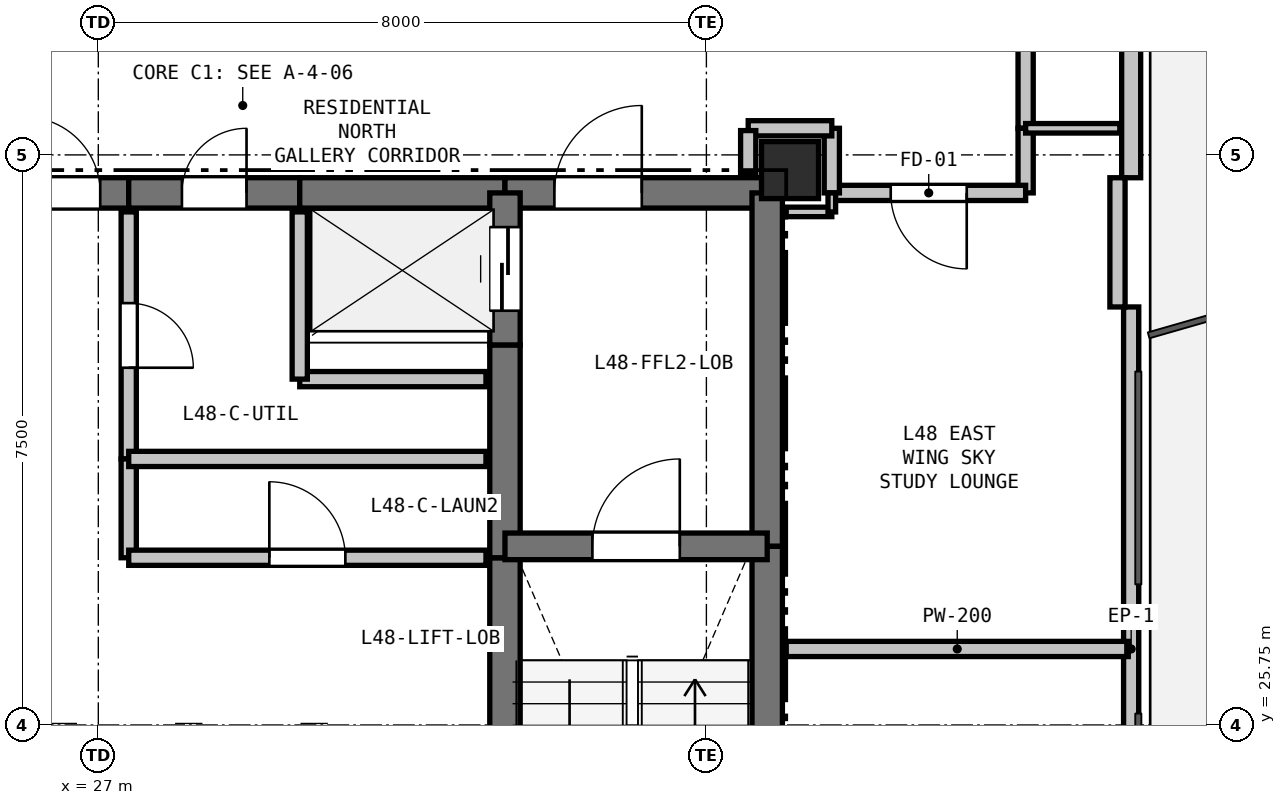
"""IFC4 building model, lengths in metres.
Left out: names, types, materials, properties, quantities, classifications, styles, units other than length and angle.
Written with IfcOpenShell. Run it as: python <this file> out.ifc"""

import sys

from ifc_helpers import new_model, si_unit, direction, frame, frame_2d, origin, origin_2d, place, context, subcontext, project, spatial, rectangle, extrude, element, fill, save


model = new_model("IFC4")
c1 = context("Model", 3, precision=1e-05, world=origin(), true_north=direction((0.0, 1.0)))
c2 = subcontext(c1, "Body", "Model", "MODEL_VIEW")
j1 = project(units=[si_unit("LENGTHUNIT", "METRE"), si_unit("PLANEANGLEUNIT", "RADIAN")], contexts=[c1])
p1 = place(None, origin())
s1 = spatial("IfcSite", under=j1, at=p1, CompositionType="ELEMENT")
p2 = place(p1, origin())
s2 = spatial("IfcBuilding", under=s1, at=p2, CompositionType="ELEMENT")
p3 = place(p2, frame((0.0, 0.0, 175.5)))
s3 = spatial("IfcBuildingStorey", under=s2, at=p3, CompositionType="ELEMENT", Elevation=175.5)
p4 = place(p3, frame((36.1, 33.05, 0.0), z_axis=(0.0, 0.0, 1.0), x_axis=(1.0, 0.0, 0.0)))
e1 = element("IfcColumn", 1, at=p4, inside=s3, PredefinedType="COLUMN", context=c2, shape_type="SweptSolid", body=[
    extrude(rectangle(XDim=0.75, YDim=0.75, at=origin_2d()), origin(), (0.0, 0.0, 1.0), 3.3),
])
p5 = place(p3, frame((19.309, 34.536, 0.0), z_axis=(0.0, 0.0, 1.0), x_axis=(0.866020680503, 0.500008180874, 0.0)))
e2 = element("IfcWall", 2, at=p5, inside=s3, PredefinedType="PARAPET", context=c2, shape_type="SweptSolid", body=[
    extrude(rectangle(XDim=8.999, YDim=0.2, at=frame_2d((4.5, 0.0))), origin(), (0.0, 0.0, 1.0), 0.2),
])
p6 = place(p3, frame((40.588, 42.648, 0.0), z_axis=(0.0, 0.0, 1.0), x_axis=(0.0, -1.0, 0.0)))
e3 = element("IfcWall", 3, at=p6, inside=s3, PredefinedType="SOLIDWALL", context=c2, shape_type="SweptSolid", body=[
    extrude(rectangle(XDim=9.699, YDim=0.25, at=frame_2d((4.85, 0.0))), origin(), (0.0, 0.0, 1.0), 2.69),
])
p7 = place(p6, frame((1.73, 0.0, 0.0)))
e4 = element("IfcOpeningElement", 4, at=p7, cuts=e3, PredefinedType="OPENING", context=c2, shape_type="SweptSolid", body=[
    extrude(rectangle(XDim=1.0, YDim=2.1, at=frame_2d((0.5, 1.05))), frame((0.0, 0.135, 0.0), z_axis=(0.0, -1.0, 0.0), x_axis=(1.0, 0.0, 0.0)), (0.0, 0.0, 1.0), 0.27),
])
p8 = place(p3, frame((40.588, 31.25, 0.0), z_axis=(0.0, 0.0, 1.0), x_axis=(0.0, -1.0, 0.0)))
e5 = element("IfcWall", 5, at=p8, inside=s3, PredefinedType="PARAPET", context=c2, shape_type="SweptSolid", body=[
    extrude(rectangle(XDim=8.999, YDim=0.2, at=frame_2d((4.5, 0.0))), origin(), (0.0, 0.0, 1.0), 0.2),
])
p9 = place(p3, frame((40.408, 32.949, 0.0), z_axis=(0.0, 0.0, 1.0), x_axis=(0.0, -1.0, 0.0)))
e6 = element("IfcWall", 6, at=p9, inside=s3, PredefinedType="PARAPET", context=c2, shape_type="SweptSolid", body=[
    extrude(rectangle(XDim=1.7, YDim=0.2, at=frame_2d((0.85, 0.0))), origin(), (0.0, 0.0, 1.0), 2.69),
])
p10 = place(p3, frame((25.65, 32.75, 0.0), z_axis=(0.0, 0.0, 1.0), x_axis=(1.0, 0.0, 0.0)))
e7 = element("IfcWall", 7, at=p10, inside=s3, PredefinedType="SHEAR", context=c2, shape_type="SweptSolid", body=[
    extrude(rectangle(XDim=1.75, YDim=0.4, at=frame_2d((0.875, 0.0))), origin(), (0.0, 0.0, 1.0), 3.07),
])
p11 = place(p10, frame((0.375, 0.0, 0.0)))
e8 = element("IfcOpeningElement", 8, at=p11, cuts=e7, PredefinedType="OPENING", context=c2, shape_type="SweptSolid", body=[
    extrude(rectangle(XDim=1.0, YDim=2.15, at=frame_2d((0.5, 1.075))), frame((0.0, 0.21, 0.0), z_axis=(0.0, -1.0, 0.0), x_axis=(1.0, 0.0, 0.0)), (0.0, 0.0, 1.0), 0.42),
])
p12 = place(p3, frame((27.4, 32.75, 0.0), z_axis=(0.0, 0.0, 1.0), x_axis=(1.0, 0.0, 0.0)))
e9 = element("IfcWall", 9, at=p12, inside=s3, PredefinedType="SHEAR", context=c2, shape_type="SweptSolid", body=[
    extrude(rectangle(XDim=2.25, YDim=0.4, at=frame_2d((1.125, 0.0))), origin(), (0.0, 0.0, 1.0), 3.07),
])
p13 = place(p12, frame((0.7, 0.0, 0.0)))
e10 = element("IfcOpeningElement", 10, at=p13, cuts=e9, PredefinedType="OPENING", context=c2, shape_type="SweptSolid", body=[
    extrude(rectangle(XDim=0.85, YDim=2.1, at=frame_2d((0.425, 1.05))), frame((0.0, 0.21, 0.0), z_axis=(0.0, -1.0, 0.0), x_axis=(1.0, 0.0, 0.0)), (0.0, 0.0, 1.0), 0.42),
])
p14 = place(p3, frame((29.65, 32.75, 0.0), z_axis=(0.0, 0.0, 1.0), x_axis=(1.0, 0.0, 0.0)))
e11 = element("IfcWall", 11, at=p14, inside=s3, PredefinedType="SHEAR", context=c2, shape_type="SweptSolid", body=[
    extrude(rectangle(XDim=2.7, YDim=0.4, at=frame_2d((1.35, 0.0))), origin(), (0.0, 0.0, 1.0), 3.07),
])
p15 = place(p3, frame((32.35, 32.75, 0.0), z_axis=(0.0, 0.0, 1.0), x_axis=(1.0, 0.0, 0.0)))
e12 = element("IfcWall", 12, at=p15, inside=s3, PredefinedType="SHEAR", context=c2, shape_type="SweptSolid", body=[
    extrude(rectangle(XDim=3.45, YDim=0.4, at=frame_2d((1.725, 0.0))), origin(), (0.0, 0.0, 1.0), 3.07),
])
p16 = place(p15, frame((0.65, 0.0, 0.0)))
e13 = element("IfcOpeningElement", 13, at=p16, cuts=e12, PredefinedType="OPENING", context=c2, shape_type="SweptSolid", body=[
    extrude(rectangle(XDim=1.15, YDim=2.15, at=frame_2d((0.575, 1.075))), frame((0.0, 0.21, 0.0), z_axis=(0.0, -1.0, 0.0), x_axis=(1.0, 0.0, 0.0)), (0.0, 0.0, 1.0), 0.42),
])
p17 = place(p3, frame((35.8, 32.75, 0.0), z_axis=(0.0, 0.0, 1.0), x_axis=(0.0, -1.0, 0.0)))
e14 = element("IfcWall", 14, at=p17, inside=s3, PredefinedType="SHEAR", context=c2, shape_type="SweptSolid", body=[
    extrude(rectangle(XDim=4.65, YDim=0.4, at=frame_2d((2.325, 0.0))), origin(), (0.0, 0.0, 1.0), 3.07),
])
p18 = place(p3, frame((35.8, 28.1, 0.0), z_axis=(0.0, 0.0, 1.0), x_axis=(0.0, -1.0, 0.0)))
e15 = element("IfcWall", 15, at=p18, inside=s3, PredefinedType="SHEAR", context=c2, shape_type="SweptSolid", body=[
    extrude(rectangle(XDim=7.35, YDim=0.4, at=frame_2d((3.675, 0.0))), origin(), (0.0, 0.0, 1.0), 3.07),
])
p19 = place(p3, frame((32.35, 25.55, 0.0), z_axis=(0.0, 0.0, 1.0), x_axis=(0.0, 1.0, 0.0)))
e16 = element("IfcWall", 16, at=p19, inside=s3, PredefinedType="SHEAR", context=c2, shape_type="SweptSolid", body=[
    extrude(rectangle(XDim=2.4, YDim=0.4, at=frame_2d((1.2, 0.0))), origin(), (0.0, 0.0, 1.0), 3.07),
])
p20 = place(p3, frame((32.35, 27.95, 0.0), z_axis=(0.0, 0.0, 1.0), x_axis=(0.0, 1.0, 0.0)))
e17 = element("IfcWall", 17, at=p20, inside=s3, PredefinedType="SHEAR", context=c2, shape_type="SweptSolid", body=[
    extrude(rectangle(XDim=2.8, YDim=0.4, at=frame_2d((1.4, 0.0))), origin(), (0.0, 0.0, 1.0), 3.07),
])
p21 = place(p3, frame((32.35, 30.75, 0.0), z_axis=(0.0, 0.0, 1.0), x_axis=(0.0, 1.0, 0.0)))
e18 = element("IfcWall", 18, at=p21, inside=s3, PredefinedType="SHEAR", context=c2, shape_type="SweptSolid", body=[
    extrude(rectangle(XDim=2.0, YDim=0.4, at=frame_2d((1.0, 0.0))), origin(), (0.0, 0.0, 1.0), 3.07),
])
p22 = place(p21, frame((0.45, 0.0, 0.0)))
e19 = element("IfcOpeningElement", 19, at=p22, cuts=e18, PredefinedType="OPENING", context=c2, shape_type="SweptSolid", body=[
    extrude(rectangle(XDim=1.1, YDim=2.15, at=frame_2d((0.55, 1.075))), frame((0.0, 0.21, 0.0), z_axis=(0.0, -1.0, 0.0), x_axis=(1.0, 0.0, 0.0)), (0.0, 0.0, 1.0), 0.42),
])
p23 = place(p3, frame((32.35, 28.1, 0.0), z_axis=(0.0, 0.0, 1.0), x_axis=(1.0, 0.0, 0.0)))
e20 = element("IfcWall", 20, at=p23, inside=s3, PredefinedType="SHEAR", context=c2, shape_type="SweptSolid", body=[
    extrude(rectangle(XDim=3.45, YDim=0.35, at=frame_2d((1.725, 0.0))), origin(), (0.0, 0.0, 1.0), 3.07),
])
p24 = place(p23, frame((1.15, 0.0, 0.0)))
e21 = element("IfcOpeningElement", 21, at=p24, cuts=e20, PredefinedType="OPENING", context=c2, shape_type="SweptSolid", body=[
    extrude(rectangle(XDim=1.15, YDim=2.15, at=frame_2d((0.575, 1.075))), frame((0.0, 0.185, 0.0), z_axis=(0.0, -1.0, 0.0), x_axis=(1.0, 0.0, 0.0)), (0.0, 0.0, 1.0), 0.37),
])
p25 = place(p3, frame((32.1, 30.3, 0.0), z_axis=(0.0, 0.0, 1.0), x_axis=(-1.0, 0.0, 0.0)))
e22 = element("IfcWall", 22, at=p25, inside=s3, PredefinedType="PARTITIONING", context=c2, shape_type="SweptSolid", body=[
    extrude(rectangle(XDim=2.45, YDim=0.2, at=frame_2d((1.225, 0.0))), origin(), (0.0, 0.0, 1.0), 3.07),
])
p26 = place(p3, frame((29.65, 30.3, 0.0), z_axis=(0.0, 0.0, 1.0), x_axis=(0.0, 1.0, 0.0)))
e23 = element("IfcWall", 23, at=p26, inside=s3, PredefinedType="PARTITIONING", context=c2, shape_type="SweptSolid", body=[
    extrude(rectangle(XDim=2.2, YDim=0.2, at=frame_2d((1.1, 0.0))), origin(), (0.0, 0.0, 1.0), 3.07),
])
p27 = place(p3, frame((27.4, 32.5, 0.0), z_axis=(0.0, 0.0, 1.0), x_axis=(0.0, -1.0, 0.0)))
e24 = element("IfcWall", 24, at=p27, inside=s3, PredefinedType="PARTITIONING", context=c2, shape_type="SweptSolid", body=[
    extrude(rectangle(XDim=3.25, YDim=0.2, at=frame_2d((1.625, 0.0))), origin(), (0.0, 0.0, 1.0), 3.07),
])
p28 = place(p27, frame((1.2, 0.0, 0.0)))
e25 = element("IfcOpeningElement", 25, at=p28, cuts=e24, PredefinedType="OPENING", context=c2, shape_type="SweptSolid", body=[
    extrude(rectangle(XDim=0.85, YDim=2.1, at=frame_2d((0.425, 1.05))), frame((0.0, 0.11, 0.0), z_axis=(0.0, -1.0, 0.0), x_axis=(1.0, 0.0, 0.0)), (0.0, 0.0, 1.0), 0.22),
])
p29 = place(p3, frame((27.4, 29.25, 0.0), z_axis=(0.0, 0.0, 1.0), x_axis=(0.0, -1.0, 0.0)))
e26 = element("IfcWall", 26, at=p29, inside=s3, PredefinedType="PARTITIONING", context=c2, shape_type="SweptSolid", body=[
    extrude(rectangle(XDim=1.3, YDim=0.2, at=frame_2d((0.65, 0.0))), origin(), (0.0, 0.0, 1.0), 3.07),
])
p30 = place(p3, frame((27.4, 27.95, 0.0), z_axis=(0.0, 0.0, 1.0), x_axis=(1.0, 0.0, 0.0)))
e27 = element("IfcWall", 27, at=p30, inside=s3, PredefinedType="PARTITIONING", context=c2, shape_type="SweptSolid", body=[
    extrude(rectangle(XDim=4.7, YDim=0.2, at=frame_2d((2.35, 0.0))), origin(), (0.0, 0.0, 1.0), 3.07),
])
p31 = place(p30, frame((1.85, 0.0, 0.0)))
e28 = element("IfcOpeningElement", 28, at=p31, cuts=e27, PredefinedType="OPENING", context=c2, shape_type="SweptSolid", body=[
    extrude(rectangle(XDim=1.0, YDim=2.15, at=frame_2d((0.5, 1.075))), frame((0.0, 0.11, 0.0), z_axis=(0.0, -1.0, 0.0), x_axis=(1.0, 0.0, 0.0)), (0.0, 0.0, 1.0), 0.22),
])
p32 = place(p3, frame((39.2, 35.35, 0.0), z_axis=(0.0, 0.0, 1.0), x_axis=(0.0, -1.0, 0.0)))
e29 = element("IfcWall", 29, at=p32, inside=s3, PredefinedType="PARTITIONING", context=c2, shape_type="SweptSolid", body=[
    extrude(rectangle(XDim=1.75, YDim=0.2, at=frame_2d((0.875, 0.0))), origin(), (0.0, 0.0, 1.0), 3.07),
])
p33 = place(p3, frame((39.2, 33.6, 0.0), z_axis=(0.0, 0.0, 1.0), x_axis=(0.0, -1.0, 0.0)))
e30 = element("IfcWall", 30, at=p33, inside=s3, PredefinedType="PARTITIONING", context=c2, shape_type="SweptSolid", body=[
    extrude(rectangle(XDim=0.85, YDim=0.2, at=frame_2d((0.425, 0.0))), origin(), (0.0, 0.0, 1.0), 3.07),
])
p34 = place(p3, frame((39.2, 32.75, 0.0), z_axis=(0.0, 0.0, 1.0), x_axis=(-1.0, 0.0, 0.0)))
e31 = element("IfcWall", 31, at=p34, inside=s3, PredefinedType="PARTITIONING", context=c2, shape_type="SweptSolid", body=[
    extrude(rectangle(XDim=2.55, YDim=0.2, at=frame_2d((1.275, 0.0))), origin(), (0.0, 0.0, 1.0), 3.07),
])
p35 = place(p34, frame((0.775, 0.0, 0.0)))
e32 = element("IfcOpeningElement", 32, at=p35, cuts=e31, PredefinedType="OPENING", context=c2, shape_type="SweptSolid", body=[
    extrude(rectangle(XDim=1.0, YDim=2.15, at=frame_2d((0.5, 1.075))), frame((0.0, 0.11, 0.0), z_axis=(0.0, -1.0, 0.0), x_axis=(1.0, 0.0, 0.0)), (0.0, 0.0, 1.0), 0.22),
])
p36 = place(p3, frame((36.65, 32.75, 0.0), z_axis=(0.0, 0.0, 1.0), x_axis=(0.0, 1.0, 0.0)))
e33 = element("IfcWall", 33, at=p36, inside=s3, PredefinedType="PARTITIONING", context=c2, shape_type="SweptSolid", body=[
    extrude(rectangle(XDim=0.85, YDim=0.2, at=frame_2d((0.425, 0.0))), origin(), (0.0, 0.0, 1.0), 2.518),
])
p37 = place(p3, frame((36.65, 33.6, 0.0), z_axis=(0.0, 0.0, 1.0), x_axis=(-1.0, 0.0, 0.0)))
e34 = element("IfcWall", 34, at=p37, inside=s3, PredefinedType="PARTITIONING", context=c2, shape_type="SweptSolid", body=[
    extrude(rectangle(XDim=1.1, YDim=0.2, at=frame_2d((0.55, 0.0))), origin(), (0.0, 0.0, 1.0), 2.518),
])
p38 = place(p3, frame((35.55, 33.57, 0.0), z_axis=(0.0, 0.0, 1.0), x_axis=(0.0, -1.0, 0.0)))
e35 = element("IfcWall", 35, at=p38, inside=s3, PredefinedType="PARTITIONING", context=c2, shape_type="SweptSolid", body=[
    extrude(rectangle(XDim=0.57, YDim=0.2, at=frame_2d((0.285, 0.0))), origin(), (0.0, 0.0, 1.0), 2.595),
])
p39 = place(p3, frame((32.1, 29.25, 0.0), z_axis=(0.0, 0.0, 1.0), x_axis=(-1.0, 0.0, 0.0)))
e36 = element("IfcWall", 36, at=p39, inside=s3, PredefinedType="PARTITIONING", context=c2, shape_type="SweptSolid", body=[
    extrude(rectangle(XDim=4.7, YDim=0.2, at=frame_2d((2.35, 0.0))), origin(), (0.0, 0.0, 1.0), 3.07),
])
p40 = place(p3, frame((36.05, 32.5, 0.0), z_axis=(0.0, 0.0, 1.0), x_axis=(1.0, 0.0, 0.0)))
e37 = element("IfcWall", 37, at=p40, inside=s3, PredefinedType="PARTITIONING", context=c2, shape_type="SweptSolid", body=[
    extrude(rectangle(XDim=0.6, YDim=0.125, at=frame_2d((0.3, 0.0))), origin(), (0.0, 0.0, 1.0), 2.595),
])
p41 = place(p3, frame((36.65, 32.5, 0.0), z_axis=(0.0, 0.0, 1.0), x_axis=(0.0, 1.0, 0.0)))
e38 = element("IfcWall", 38, at=p41, inside=s3, PredefinedType="PARTITIONING", context=c2, shape_type="SweptSolid", body=[
    extrude(rectangle(XDim=0.25, YDim=0.1, at=frame_2d((0.125, 0.0))), origin(), (0.0, 0.0, 1.0), 3.07),
])
p42 = place(p3, frame((39.2, 33.6, 0.0), z_axis=(0.0, 0.0, 1.0), x_axis=(1.0, 0.0, 0.0)))
e39 = element("IfcWall", 39, at=p42, inside=s3, PredefinedType="PARTITIONING", context=c2, shape_type="SweptSolid", body=[
    extrude(rectangle(XDim=1.24, YDim=0.125, at=frame_2d((0.62, 0.0))), origin(), (0.0, 0.0, 1.0), 2.365),
])
p43 = place(p3, frame((40.55, 26.75, 0.0), z_axis=(0.0, 0.0, 1.0), x_axis=(-1.0, 0.0, 0.0)))
e40 = element("IfcWall", 40, at=p43, inside=s3, PredefinedType="PARTITIONING", context=c2, shape_type="SweptSolid", body=[
    extrude(rectangle(XDim=4.5, YDim=0.2, at=frame_2d((2.25, 0.0))), origin(), (0.0, 0.0, 1.0), 2.365),
])
p44 = place(p11, origin())
e41 = element("IfcDoor", 41, at=p44, inside=s3, OperationType="SINGLE_SWING_LEFT", PredefinedType="DOOR", context=c2, shape_type="SweptSolid", body=[
    extrude(rectangle(XDim=1.0, YDim=2.15, at=frame_2d((0.5, 1.075))), frame((0.0, 0.025, 0.0), z_axis=(0.0, -1.0, 0.0), x_axis=(1.0, 0.0, 0.0)), (0.0, 0.0, 1.0), 0.05),
])
fill(e8, e41)
p45 = place(p22, origin())
e42 = element("IfcDoor", 42, at=p45, inside=s3, OperationType="SLIDING_TO_LEFT", PredefinedType="DOOR", context=c2, shape_type="SweptSolid", body=[
    extrude(rectangle(XDim=1.1, YDim=2.15, at=frame_2d((0.55, 1.075))), frame((0.0, 0.025, 0.0), z_axis=(0.0, -1.0, 0.0), x_axis=(1.0, 0.0, 0.0)), (0.0, 0.0, 1.0), 0.05),
])
fill(e19, e42)
p46 = place(p24, origin())
e43 = element("IfcDoor", 43, at=p46, inside=s3, OperationType="SINGLE_SWING_RIGHT", PredefinedType="DOOR", context=c2, shape_type="SweptSolid", body=[
    extrude(rectangle(XDim=1.15, YDim=2.15, at=frame_2d((0.575, 1.075))), frame((0.0, 0.025, 0.0), z_axis=(0.0, -1.0, 0.0), x_axis=(1.0, 0.0, 0.0)), (0.0, 0.0, 1.0), 0.05),
])
fill(e21, e43)
p47 = place(p16, origin())
e44 = element("IfcDoor", 44, at=p47, inside=s3, OperationType="SINGLE_SWING_RIGHT", PredefinedType="DOOR", context=c2, shape_type="SweptSolid", body=[
    extrude(rectangle(XDim=1.15, YDim=2.15, at=frame_2d((0.575, 1.075))), frame((0.0, 0.025, 0.0), z_axis=(0.0, -1.0, 0.0), x_axis=(1.0, 0.0, 0.0)), (0.0, 0.0, 1.0), 0.05),
])
fill(e13, e44)
p48 = place(p28, origin())
e45 = element("IfcDoor", 45, at=p48, inside=s3, OperationType="SINGLE_SWING_RIGHT", PredefinedType="DOOR", context=c2, shape_type="SweptSolid", body=[
    extrude(rectangle(XDim=0.85, YDim=2.1, at=frame_2d((0.425, 1.05))), frame((0.0, 0.025, 0.0), z_axis=(0.0, -1.0, 0.0), x_axis=(1.0, 0.0, 0.0)), (0.0, 0.0, 1.0), 0.05),
])
fill(e25, e45)
p49 = place(p31, origin())
e46 = element("IfcDoor", 46, at=p49, inside=s3, OperationType="SINGLE_SWING_LEFT", PredefinedType="DOOR", context=c2, shape_type="SweptSolid", body=[
    extrude(rectangle(XDim=1.0, YDim=2.15, at=frame_2d((0.5, 1.075))), frame((0.0, 0.025, 0.0), z_axis=(0.0, -1.0, 0.0), x_axis=(1.0, 0.0, 0.0)), (0.0, 0.0, 1.0), 0.05),
])
fill(e28, e46)
p50 = place(p13, origin())
e47 = element("IfcDoor", 47, at=p50, inside=s3, OperationType="SINGLE_SWING_RIGHT", PredefinedType="DOOR", context=c2, shape_type="SweptSolid", body=[
    extrude(rectangle(XDim=0.85, YDim=2.1, at=frame_2d((0.425, 1.05))), frame((0.0, 0.025, 0.0), z_axis=(0.0, -1.0, 0.0), x_axis=(1.0, 0.0, 0.0)), (0.0, 0.0, 1.0), 0.05),
])
fill(e10, e47)
p51 = place(p35, origin())
e48 = element("IfcDoor", 48, at=p51, inside=s3, OperationType="SINGLE_SWING_LEFT", PredefinedType="DOOR", context=c2, shape_type="SweptSolid", body=[
    extrude(rectangle(XDim=1.0, YDim=2.15, at=frame_2d((0.5, 1.075))), frame((0.0, 0.025, 0.0), z_axis=(0.0, -1.0, 0.0), x_axis=(1.0, 0.0, 0.0)), (0.0, 0.0, 1.0), 0.05),
])
fill(e32, e48)
save(model, sys.argv[1])
